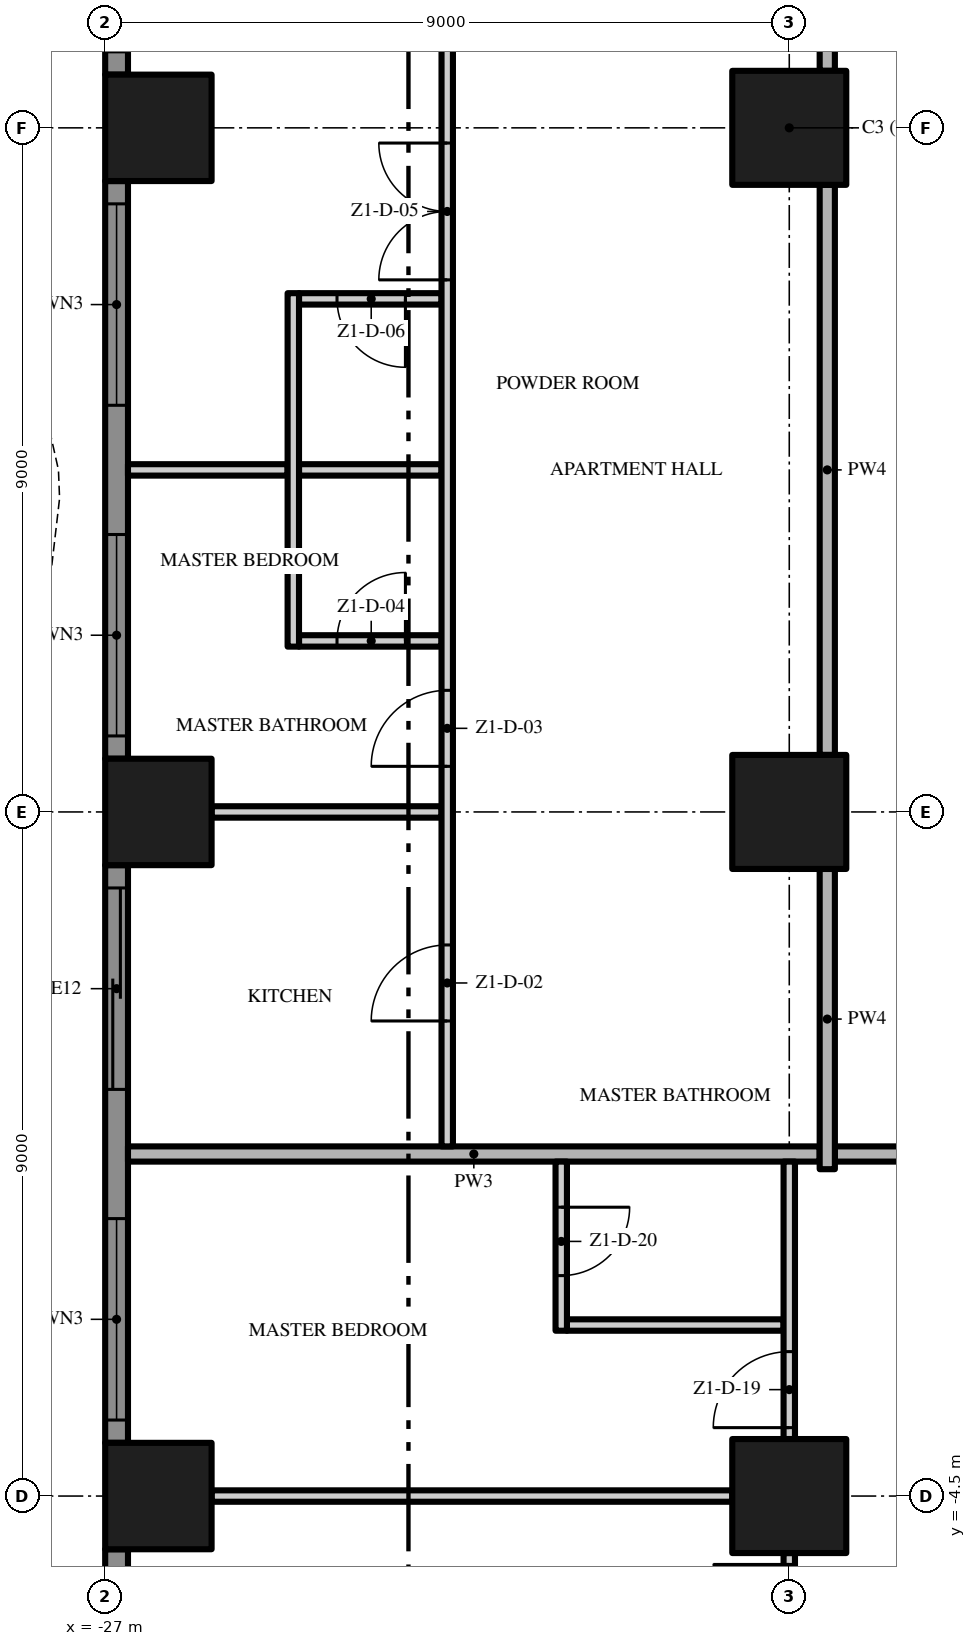
"""IFC4 building model, lengths in metres.
Left out: names, types, materials, properties, quantities, classifications, styles, units other than length and angle.
Written with IfcOpenShell. Run it as: python <this file> out.ifc"""

import sys

from ifc_helpers import new_model, si_unit, direction, frame, frame_2d, origin, origin_2d, place, context, subcontext, project, spatial, polyline, rectangle, outline, extrude, element, fill, save


model = new_model("IFC4")
c1 = context("Model", 3, precision=1e-05, world=origin(), true_north=direction((0.0, 1.0)))
c2 = subcontext(c1, "Body", "Model", "MODEL_VIEW")
j1 = project(units=[si_unit("LENGTHUNIT", "METRE"), si_unit("PLANEANGLEUNIT", "RADIAN")], contexts=[c1])
p1 = place(None, origin())
s1 = spatial("IfcSite", under=j1, at=p1, CompositionType="ELEMENT")
p2 = place(p1, origin())
s2 = spatial("IfcBuilding", under=s1, at=p2, CompositionType="ELEMENT")
p3 = place(p2, frame((0.0, 0.0, 49.2)))
s3 = spatial("IfcBuildingStorey", under=s2, at=p3, CompositionType="ELEMENT", Elevation=49.2)
for number, where, z_axis, x_axis in (
    (1, (-18.0, -4.5, 0.0), (0.0, 0.0, 1.0), (1.0, 0.0, 0.0)),
    (2, (-18.0, 13.5, 0.0), (0.0, 0.0, 1.0), (1.0, 0.0, 0.0)),
    (3, (-18.0, 4.5, 0.0), (0.0, 0.0, 1.0), (1.0, 0.0, 0.0)),
):
    element("IfcColumn", number, at=place(p3, frame(where, z_axis=z_axis, x_axis=x_axis)), inside=s3, PredefinedType="COLUMN", context=c2, shape_type="SweptSolid", body=[
        extrude(rectangle(XDim=1.5, YDim=1.5, at=origin_2d()), origin(), (0.0, 0.0, 1.0), 3.5),
    ])
for number, where, z_axis, x_axis in (
    (4, (-26.3, -4.5, 0.0), (0.0, 0.0, 1.0), (1.0, 0.0, 0.0)),
    (5, (-26.3, 13.5, 0.0), (0.0, 0.0, 1.0), (1.0, 0.0, 0.0)),
    (6, (-26.3, 4.5, 0.0), (0.0, 0.0, 1.0), (1.0, 0.0, 0.0)),
):
    element("IfcColumn", number, at=place(p3, frame(where, z_axis=z_axis, x_axis=x_axis)), inside=s3, PredefinedType="COLUMN", context=c2, shape_type="SweptSolid", body=[
        extrude(rectangle(XDim=1.4, YDim=1.4, at=origin_2d()), origin(), (0.0, 0.0, 1.0), 3.5),
    ])
p4 = place(p3, frame((-26.85, 14.2, 0.0), z_axis=(0.0, 0.0, 1.0), x_axis=(0.0, 1.0, 0.0)))
e7 = element("IfcWall", 7, at=p4, inside=s3, PredefinedType="SOLIDWALL", context=c2, shape_type="SweptSolid", body=[
    extrude(rectangle(XDim=3.5, YDim=0.3, at=frame_2d((1.75, 0.0))), origin(), (0.0, 0.0, 1.0), 3.5),
])
p5 = place(p4, frame((0.3, 0.0, 0.0)))
e8 = element("IfcOpeningElement", 8, at=p5, cuts=e7, PredefinedType="OPENING", context=c2, shape_type="SweptSolid", body=[
    extrude(rectangle(XDim=2.65, YDim=2.4, at=frame_2d((1.325, 1.2))), frame((0.0, 0.16, 0.0), z_axis=(0.0, -1.0, 0.0), x_axis=(1.0, 0.0, 0.0)), (0.0, 0.0, 1.0), 0.32),
])
p6 = place(p3, frame((-26.85, 5.2, 0.0), z_axis=(0.0, 0.0, 1.0), x_axis=(0.0, 1.0, 0.0)))
e9 = element("IfcWall", 9, at=p6, inside=s3, PredefinedType="SOLIDWALL", context=c2, shape_type="SweptSolid", body=[
    extrude(rectangle(XDim=7.6, YDim=0.3, at=frame_2d((3.8, 0.0))), origin(), (0.0, 0.0, 1.0), 3.5),
])
p7 = place(p6, frame((4.65, 0.0, 0.45)))
e10 = element("IfcOpeningElement", 10, at=p7, cuts=e9, PredefinedType="OPENING", context=c2, shape_type="SweptSolid", body=[
    extrude(rectangle(XDim=2.65, YDim=2.65, at=frame_2d((1.325, 1.325))), frame((0.0, 0.16, 0.0), z_axis=(0.0, -1.0, 0.0), x_axis=(1.0, 0.0, 0.0)), (0.0, 0.0, 1.0), 0.32),
])
p8 = place(p6, frame((0.3, 0.0, 0.45)))
e11 = element("IfcOpeningElement", 11, at=p8, cuts=e9, PredefinedType="OPENING", context=c2, shape_type="SweptSolid", body=[
    extrude(rectangle(XDim=2.65, YDim=2.65, at=frame_2d((1.325, 1.325))), frame((0.0, 0.16, 0.0), z_axis=(0.0, -1.0, 0.0), x_axis=(1.0, 0.0, 0.0)), (0.0, 0.0, 1.0), 0.32),
])
p9 = place(p3, frame((-26.85, -3.8, 0.0), z_axis=(0.0, 0.0, 1.0), x_axis=(0.0, 1.0, 0.0)))
e12 = element("IfcWall", 12, at=p9, inside=s3, PredefinedType="SOLIDWALL", context=c2, shape_type="SweptSolid", body=[
    extrude(rectangle(XDim=7.6, YDim=0.3, at=frame_2d((3.8, 0.0))), origin(), (0.0, 0.0, 1.0), 3.5),
])
p10 = place(p9, frame((4.65, 0.0, 0.0)))
e13 = element("IfcOpeningElement", 13, at=p10, cuts=e12, PredefinedType="OPENING", context=c2, shape_type="SweptSolid", body=[
    extrude(rectangle(XDim=2.65, YDim=2.4, at=frame_2d((1.325, 1.2))), frame((0.0, 0.16, 0.0), z_axis=(0.0, -1.0, 0.0), x_axis=(1.0, 0.0, 0.0)), (0.0, 0.0, 1.0), 0.32),
])
p11 = place(p9, frame((0.3, 0.0, 0.45)))
e14 = element("IfcOpeningElement", 14, at=p11, cuts=e12, PredefinedType="OPENING", context=c2, shape_type="SweptSolid", body=[
    extrude(rectangle(XDim=2.65, YDim=2.65, at=frame_2d((1.325, 1.325))), frame((0.0, 0.16, 0.0), z_axis=(0.0, -1.0, 0.0), x_axis=(1.0, 0.0, 0.0)), (0.0, 0.0, 1.0), 0.32),
])
p12 = place(p3, frame((-26.85, -12.8, 0.0), z_axis=(0.0, 0.0, 1.0), x_axis=(0.0, 1.0, 0.0)))
e15 = element("IfcWall", 15, at=p12, inside=s3, PredefinedType="SOLIDWALL", context=c2, shape_type="SweptSolid", body=[
    extrude(rectangle(XDim=7.6, YDim=0.3, at=frame_2d((3.8, 0.0))), origin(), (0.0, 0.0, 1.0), 3.5),
])
p13 = place(p12, frame((4.65, 0.0, 0.45)))
e16 = element("IfcOpeningElement", 16, at=p13, cuts=e15, PredefinedType="OPENING", context=c2, shape_type="SweptSolid", body=[
    extrude(rectangle(XDim=2.65, YDim=2.65, at=frame_2d((1.325, 1.325))), frame((0.0, 0.16, 0.0), z_axis=(0.0, -1.0, 0.0), x_axis=(1.0, 0.0, 0.0)), (0.0, 0.0, 1.0), 0.32),
])
p14 = place(p12, frame((0.3, 0.0, 0.0)))
e17 = element("IfcOpeningElement", 17, at=p14, cuts=e15, PredefinedType="OPENING", context=c2, shape_type="SweptSolid", body=[
    extrude(rectangle(XDim=2.65, YDim=2.4, at=frame_2d((1.325, 1.2))), frame((0.0, 0.16, 0.0), z_axis=(0.0, -1.0, 0.0), x_axis=(1.0, 0.0, 0.0)), (0.0, 0.0, 1.0), 0.32),
])
p15 = place(p3, origin())
e18 = element("IfcWall", 18, at=p15, inside=s3, PredefinedType="USERDEFINED", context=c2, shape_type="SweptSolid", body=[
    extrude(outline(polyline([(-29.649, 18.0), (-29.985, 16.5), (-30.0, 16.125), (-29.869, 15.0), (-29.345, 13.5), (-28.612, 12.0), (-27.951, 10.5), (-27.615, 9.0), (-27.6, 8.625), (-27.731, 7.5), (-28.255, 6.0), (-28.988, 4.5), (-29.649, 3.0), (-29.985, 1.5), (-30.0, 1.125), (-29.869, 0.0), (-29.345, -1.5), (-28.612, -3.0), (-27.951, -4.5), (-27.615, -6.0), (-27.6, -6.375), (-27.731, -7.5), (-28.255, -9.0), (-28.988, -10.5), (-29.649, -12.0), (-29.985, -13.5), (-30.0, -13.875), (-29.869, -15.0), (-29.345, -16.5), (-28.612, -18.0), (-28.388, -17.89), (-29.114, -16.404), (-29.624, -14.944), (-29.749, -13.865), (-29.736, -13.533), (-29.41, -12.079), (-28.761, -10.605), (-28.024, -9.096), (-27.486, -7.556), (-27.349, -6.385), (-27.366, -5.967), (-27.713, -4.421), (-28.385, -2.895), (-29.114, -1.404), (-29.624, 0.056), (-29.749, 1.135), (-29.736, 1.467), (-29.41, 2.921), (-28.761, 4.395), (-28.024, 5.904), (-27.486, 7.444), (-27.349, 8.615), (-27.366, 9.033), (-27.713, 10.579), (-28.385, 12.105), (-29.114, 13.596), (-29.624, 15.056), (-29.749, 16.135), (-29.736, 16.467), (-29.405, 17.945), (-29.649, 18.0)])), origin(), (0.0, 0.0, 1.0), 0.9),
])
p16 = place(p3, frame((-25.6, -4.5, 0.0), z_axis=(0.0, 0.0, 1.0), x_axis=(1.0, 0.0, 0.0)))
e19 = element("IfcWall", 19, at=p16, inside=s3, PredefinedType="PARTITIONING", context=c2, shape_type="SweptSolid", body=[
    extrude(rectangle(XDim=6.85, YDim=0.15, at=frame_2d((3.425, 0.0))), origin(), (0.0, 0.0, 1.0), 3.5),
])
p17 = place(p3, frame((-20.925, -2.25, 0.0), z_axis=(0.0, 0.0, 1.0), x_axis=(1.0, 0.0, 0.0)))
e20 = element("IfcWall", 20, at=p17, inside=s3, PredefinedType="PARTITIONING", context=c2, shape_type="SweptSolid", body=[
    extrude(rectangle(XDim=2.85, YDim=0.15, at=frame_2d((1.425, 0.0))), origin(), (0.0, 0.0, 1.0), 3.5),
])
p18 = place(p3, frame((-17.4, 0.0, 0.0), z_axis=(0.0, 0.0, 1.0), x_axis=(1.0, 0.0, 0.0)))
e21 = element("IfcWall", 21, at=p18, inside=s3, PredefinedType="PARTITIONING", context=c2, shape_type="SweptSolid", body=[
    extrude(rectangle(XDim=12.8, YDim=0.2, at=frame_2d((6.4, 0.0))), origin(), (0.0, 0.0, 1.0), 3.5),
])
p19 = place(p3, frame((-26.7, 0.0, 0.0), z_axis=(0.0, 0.0, 1.0), x_axis=(1.0, 0.0, 0.0)))
e22 = element("IfcWall", 22, at=p19, inside=s3, PredefinedType="PARTITIONING", context=c2, shape_type="SweptSolid", body=[
    extrude(rectangle(XDim=9.1, YDim=0.2, at=frame_2d((4.55, 0.0))), origin(), (0.0, 0.0, 1.0), 3.5),
])
p20 = place(p3, frame((-25.6, 4.5, 0.0), z_axis=(0.0, 0.0, 1.0), x_axis=(1.0, 0.0, 0.0)))
e23 = element("IfcWall", 23, at=p20, inside=s3, PredefinedType="PARTITIONING", context=c2, shape_type="SweptSolid", body=[
    extrude(rectangle(XDim=3.025, YDim=0.15, at=frame_2d((1.512, 0.0))), origin(), (0.0, 0.0, 1.0), 3.5),
])
p21 = place(p3, frame((-24.45, 6.75, 0.0), z_axis=(0.0, 0.0, 1.0), x_axis=(1.0, 0.0, 0.0)))
e24 = element("IfcWall", 24, at=p21, inside=s3, PredefinedType="PARTITIONING", context=c2, shape_type="SweptSolid", body=[
    extrude(rectangle(XDim=1.875, YDim=0.15, at=frame_2d((0.938, 0.0))), origin(), (0.0, 0.0, 1.0), 3.5),
])
p22 = place(p21, frame((0.5, 0.0, 0.0)))
e25 = element("IfcOpeningElement", 25, at=p22, cuts=e24, PredefinedType="OPENING", context=c2, shape_type="SweptSolid", body=[
    extrude(rectangle(XDim=0.9, YDim=2.1, at=frame_2d((0.45, 1.05))), frame((0.0, 0.085, 0.0), z_axis=(0.0, -1.0, 0.0), x_axis=(1.0, 0.0, 0.0)), (0.0, 0.0, 1.0), 0.17),
])
p23 = place(p3, frame((-26.7, 9.0, 0.0), z_axis=(0.0, 0.0, 1.0), x_axis=(1.0, 0.0, 0.0)))
e26 = element("IfcWall", 26, at=p23, inside=s3, PredefinedType="PARTITIONING", context=c2, shape_type="SweptSolid", body=[
    extrude(rectangle(XDim=2.1, YDim=0.15, at=frame_2d((1.05, 0.0))), origin(), (0.0, 0.0, 1.0), 3.5),
])
p24 = place(p3, frame((-24.45, 9.0, 0.0), z_axis=(0.0, 0.0, 1.0), x_axis=(1.0, 0.0, 0.0)))
e27 = element("IfcWall", 27, at=p24, inside=s3, PredefinedType="PARTITIONING", context=c2, shape_type="SweptSolid", body=[
    extrude(rectangle(XDim=1.875, YDim=0.15, at=frame_2d((0.938, 0.0))), origin(), (0.0, 0.0, 1.0), 3.5),
])
p25 = place(p3, frame((-22.575, 11.25, 0.0), z_axis=(0.0, 0.0, 1.0), x_axis=(-1.0, 0.0, 0.0)))
e28 = element("IfcWall", 28, at=p25, inside=s3, PredefinedType="PARTITIONING", context=c2, shape_type="SweptSolid", body=[
    extrude(rectangle(XDim=1.875, YDim=0.15, at=frame_2d((0.938, 0.0))), origin(), (0.0, 0.0, 1.0), 3.5),
])
p26 = place(p25, frame((0.475, 0.0, 0.0)))
e29 = element("IfcOpeningElement", 29, at=p26, cuts=e28, PredefinedType="OPENING", context=c2, shape_type="SweptSolid", body=[
    extrude(rectangle(XDim=0.9, YDim=2.1, at=frame_2d((0.45, 1.05))), frame((0.0, 0.085, 0.0), z_axis=(0.0, -1.0, 0.0), x_axis=(1.0, 0.0, 0.0)), (0.0, 0.0, 1.0), 0.17),
])
p27 = place(p3, frame((-24.525, 6.675, 0.0), z_axis=(0.0, 0.0, 1.0), x_axis=(0.0, 1.0, 0.0)))
e30 = element("IfcWall", 30, at=p27, inside=s3, PredefinedType="PARTITIONING", context=c2, shape_type="SweptSolid", body=[
    extrude(rectangle(XDim=4.65, YDim=0.15, at=frame_2d((2.325, 0.0))), origin(), (0.0, 0.0, 1.0), 3.5),
])
p28 = place(p3, frame((-22.5, 0.1, 0.0), z_axis=(0.0, 0.0, 1.0), x_axis=(0.0, 1.0, 0.0)))
e31 = element("IfcWall", 31, at=p28, inside=s3, PredefinedType="PARTITIONING", context=c2, shape_type="SweptSolid", body=[
    extrude(rectangle(XDim=17.2, YDim=0.15, at=frame_2d((8.6, 0.0))), origin(), (0.0, 0.0, 1.0), 3.5),
])
p29 = place(p28, frame((1.65, 0.0, 0.0)))
e32 = element("IfcOpeningElement", 32, at=p29, cuts=e31, PredefinedType="OPENING", context=c2, shape_type="SweptSolid", body=[
    extrude(rectangle(XDim=1.0, YDim=2.4, at=frame_2d((0.5, 1.2))), frame((0.0, 0.085, 0.0), z_axis=(0.0, -1.0, 0.0), x_axis=(1.0, 0.0, 0.0)), (0.0, 0.0, 1.0), 0.17),
])
p30 = place(p28, frame((5.0, 0.0, 0.0)))
e33 = element("IfcOpeningElement", 33, at=p30, cuts=e31, PredefinedType="OPENING", context=c2, shape_type="SweptSolid", body=[
    extrude(rectangle(XDim=1.0, YDim=2.4, at=frame_2d((0.5, 1.2))), frame((0.0, 0.085, 0.0), z_axis=(0.0, -1.0, 0.0), x_axis=(1.0, 0.0, 0.0)), (0.0, 0.0, 1.0), 0.17),
])
p31 = place(p28, frame((11.4, 0.0, 0.0)))
e34 = element("IfcOpeningElement", 34, at=p31, cuts=e31, PredefinedType="OPENING", context=c2, shape_type="SweptSolid", body=[
    extrude(rectangle(XDim=1.8, YDim=2.4, at=frame_2d((0.9, 1.2))), frame((0.0, 0.085, 0.0), z_axis=(0.0, -1.0, 0.0), x_axis=(1.0, 0.0, 0.0)), (0.0, 0.0, 1.0), 0.17),
])
p32 = place(p3, frame((-21.0, -0.1, 0.0), z_axis=(0.0, 0.0, 1.0), x_axis=(0.0, -1.0, 0.0)))
e35 = element("IfcWall", 35, at=p32, inside=s3, PredefinedType="PARTITIONING", context=c2, shape_type="SweptSolid", body=[
    extrude(rectangle(XDim=2.225, YDim=0.15, at=frame_2d((1.113, 0.0))), origin(), (0.0, 0.0, 1.0), 3.5),
])
p33 = place(p32, frame((0.6, 0.0, 0.0)))
e36 = element("IfcOpeningElement", 36, at=p33, cuts=e35, PredefinedType="OPENING", context=c2, shape_type="SweptSolid", body=[
    extrude(rectangle(XDim=0.9, YDim=2.1, at=frame_2d((0.45, 1.05))), frame((0.0, 0.085, 0.0), z_axis=(0.0, -1.0, 0.0), x_axis=(1.0, 0.0, 0.0)), (0.0, 0.0, 1.0), 0.17),
])
p34 = place(p3, frame((-18.0, -12.75, 0.0), z_axis=(0.0, 0.0, 1.0), x_axis=(0.0, 1.0, 0.0)))
e37 = element("IfcWall", 37, at=p34, inside=s3, PredefinedType="PARTITIONING", context=c2, shape_type="SweptSolid", body=[
    extrude(rectangle(XDim=7.5, YDim=0.15, at=frame_2d((3.75, 0.0))), origin(), (0.0, 0.0, 1.0), 3.5),
])
p35 = place(p34, frame((6.35, 0.0, 0.0)))
e38 = element("IfcOpeningElement", 38, at=p35, cuts=e37, PredefinedType="OPENING", context=c2, shape_type="SweptSolid", body=[
    extrude(rectangle(XDim=1.0, YDim=2.4, at=frame_2d((0.5, 1.2))), frame((0.0, 0.085, 0.0), z_axis=(0.0, -1.0, 0.0), x_axis=(1.0, 0.0, 0.0)), (0.0, 0.0, 1.0), 0.17),
])
p36 = place(p34, frame((0.15, 0.0, 0.0)))
e39 = element("IfcOpeningElement", 39, at=p36, cuts=e37, PredefinedType="OPENING", context=c2, shape_type="SweptSolid", body=[
    extrude(rectangle(XDim=1.0, YDim=2.4, at=frame_2d((0.5, 1.2))), frame((0.0, 0.085, 0.0), z_axis=(0.0, -1.0, 0.0), x_axis=(1.0, 0.0, 0.0)), (0.0, 0.0, 1.0), 0.17),
])
p37 = place(p3, frame((-18.0, -3.75, 0.0), z_axis=(0.0, 0.0, 1.0), x_axis=(0.0, 1.0, 0.0)))
e40 = element("IfcWall", 40, at=p37, inside=s3, PredefinedType="PARTITIONING", context=c2, shape_type="SweptSolid", body=[
    extrude(rectangle(XDim=3.65, YDim=0.15, at=frame_2d((1.825, 0.0))), origin(), (0.0, 0.0, 1.0), 3.5),
])
p38 = place(p37, frame((0.15, 0.0, 0.0)))
e41 = element("IfcOpeningElement", 41, at=p38, cuts=e40, PredefinedType="OPENING", context=c2, shape_type="SweptSolid", body=[
    extrude(rectangle(XDim=1.0, YDim=2.4, at=frame_2d((0.5, 1.2))), frame((0.0, 0.085, 0.0), z_axis=(0.0, -1.0, 0.0), x_axis=(1.0, 0.0, 0.0)), (0.0, 0.0, 1.0), 0.17),
])
p39 = place(p3, frame((-17.5, -0.2, 0.0), z_axis=(0.0, 0.0, 1.0), x_axis=(0.0, 1.0, 0.0)))
e42 = element("IfcWall", 42, at=p39, inside=s3, PredefinedType="PARTITIONING", context=c2, shape_type="SweptSolid", body=[
    extrude(rectangle(XDim=3.95, YDim=0.2, at=frame_2d((1.975, 0.0))), origin(), (0.0, 0.0, 1.0), 3.5),
])
p40 = place(p3, frame((-17.5, 5.25, 0.0), z_axis=(0.0, 0.0, 1.0), x_axis=(0.0, 1.0, 0.0)))
e43 = element("IfcWall", 43, at=p40, inside=s3, PredefinedType="PARTITIONING", context=c2, shape_type="SweptSolid", body=[
    extrude(rectangle(XDim=7.5, YDim=0.2, at=frame_2d((3.75, 0.0))), origin(), (0.0, 0.0, 1.0), 3.5),
])
p41 = place(p3, frame((-17.5, 14.25, 0.0), z_axis=(0.0, 0.0, 1.0), x_axis=(0.0, 1.0, 0.0)))
e44 = element("IfcWall", 44, at=p41, inside=s3, PredefinedType="PARTITIONING", context=c2, shape_type="SweptSolid", body=[
    extrude(rectangle(XDim=6.85, YDim=0.2, at=frame_2d((3.425, 0.0))), origin(), (0.0, 0.0, 1.0), 3.5),
])
p42 = place(p41, frame((0.9, 0.0, 0.0)))
e45 = element("IfcOpeningElement", 45, at=p42, cuts=e44, PredefinedType="OPENING", context=c2, shape_type="SweptSolid", body=[
    extrude(rectangle(XDim=1.2, YDim=2.4, at=frame_2d((0.6, 1.2))), frame((0.0, 0.11, 0.0), z_axis=(0.0, -1.0, 0.0), x_axis=(1.0, 0.0, 0.0)), (0.0, 0.0, 1.0), 0.22),
])
p43 = place(p7, origin())
e46 = element("IfcWindow", 46, at=p43, inside=s3, PartitioningType="SINGLE_PANEL", PredefinedType="WINDOW", context=c2, shape_type="SweptSolid", body=[
    extrude(rectangle(XDim=2.65, YDim=2.65, at=frame_2d((1.325, 1.325))), frame((0.0, 0.03, 0.0), z_axis=(0.0, -1.0, 0.0), x_axis=(1.0, 0.0, 0.0)), (0.0, 0.0, 1.0), 0.06),
])
fill(e10, e46)
p44 = place(p8, origin())
e47 = element("IfcWindow", 47, at=p44, inside=s3, PartitioningType="SINGLE_PANEL", PredefinedType="WINDOW", context=c2, shape_type="SweptSolid", body=[
    extrude(rectangle(XDim=2.65, YDim=2.65, at=frame_2d((1.325, 1.325))), frame((0.0, 0.03, 0.0), z_axis=(0.0, -1.0, 0.0), x_axis=(1.0, 0.0, 0.0)), (0.0, 0.0, 1.0), 0.06),
])
fill(e11, e47)
p45 = place(p10, origin())
e48 = element("IfcDoor", 48, at=p45, inside=s3, OperationType="SINGLE_SWING_LEFT", PredefinedType="DOOR", context=c2, shape_type="SweptSolid", body=[
    extrude(rectangle(XDim=2.65, YDim=2.4, at=frame_2d((1.325, 1.2))), frame((0.0, 0.025, 0.0), z_axis=(0.0, -1.0, 0.0), x_axis=(1.0, 0.0, 0.0)), (0.0, 0.0, 1.0), 0.05),
])
fill(e13, e48)
p46 = place(p11, origin())
e49 = element("IfcWindow", 49, at=p46, inside=s3, PartitioningType="SINGLE_PANEL", PredefinedType="WINDOW", context=c2, shape_type="SweptSolid", body=[
    extrude(rectangle(XDim=2.65, YDim=2.65, at=frame_2d((1.325, 1.325))), frame((0.0, 0.03, 0.0), z_axis=(0.0, -1.0, 0.0), x_axis=(1.0, 0.0, 0.0)), (0.0, 0.0, 1.0), 0.06),
])
fill(e14, e49)
p47 = place(p29, origin())
e50 = element("IfcDoor", 50, at=p47, inside=s3, OperationType="SINGLE_SWING_LEFT", PredefinedType="DOOR", context=c2, shape_type="SweptSolid", body=[
    extrude(rectangle(XDim=1.0, YDim=2.4, at=frame_2d((0.5, 1.2))), frame((0.0, 0.025, 0.0), z_axis=(0.0, -1.0, 0.0), x_axis=(1.0, 0.0, 0.0)), (0.0, 0.0, 1.0), 0.05),
])
fill(e32, e50)
p48 = place(p30, origin())
e51 = element("IfcDoor", 51, at=p48, inside=s3, OperationType="SINGLE_SWING_LEFT", PredefinedType="DOOR", context=c2, shape_type="SweptSolid", body=[
    extrude(rectangle(XDim=1.0, YDim=2.4, at=frame_2d((0.5, 1.2))), frame((0.0, 0.025, 0.0), z_axis=(0.0, -1.0, 0.0), x_axis=(1.0, 0.0, 0.0)), (0.0, 0.0, 1.0), 0.05),
])
fill(e33, e51)
p49 = place(p22, origin())
e52 = element("IfcDoor", 52, at=p49, inside=s3, OperationType="SINGLE_SWING_RIGHT", PredefinedType="DOOR", context=c2, shape_type="SweptSolid", body=[
    extrude(rectangle(XDim=0.9, YDim=2.1, at=frame_2d((0.45, 1.05))), frame((0.0, 0.025, 0.0), z_axis=(0.0, -1.0, 0.0), x_axis=(1.0, 0.0, 0.0)), (0.0, 0.0, 1.0), 0.05),
])
fill(e25, e52)
p50 = place(p31, origin())
e53 = element("IfcDoor", 53, at=p50, inside=s3, OperationType="DOUBLE_DOOR_SINGLE_SWING", PredefinedType="DOOR", context=c2, shape_type="SweptSolid", body=[
    extrude(rectangle(XDim=1.8, YDim=2.4, at=frame_2d((0.9, 1.2))), frame((0.0, 0.025, 0.0), z_axis=(0.0, -1.0, 0.0), x_axis=(1.0, 0.0, 0.0)), (0.0, 0.0, 1.0), 0.05),
])
fill(e34, e53)
p51 = place(p26, origin())
e54 = element("IfcDoor", 54, at=p51, inside=s3, OperationType="SINGLE_SWING_LEFT", PredefinedType="DOOR", context=c2, shape_type="SweptSolid", body=[
    extrude(rectangle(XDim=0.9, YDim=2.1, at=frame_2d((0.45, 1.05))), frame((0.0, 0.025, 0.0), z_axis=(0.0, -1.0, 0.0), x_axis=(1.0, 0.0, 0.0)), (0.0, 0.0, 1.0), 0.05),
])
fill(e29, e54)
p52 = place(p38, origin())
e55 = element("IfcDoor", 55, at=p52, inside=s3, OperationType="SINGLE_SWING_LEFT", PredefinedType="DOOR", context=c2, shape_type="SweptSolid", body=[
    extrude(rectangle(XDim=1.0, YDim=2.4, at=frame_2d((0.5, 1.2))), frame((0.0, 0.025, 0.0), z_axis=(0.0, -1.0, 0.0), x_axis=(1.0, 0.0, 0.0)), (0.0, 0.0, 1.0), 0.05),
])
fill(e41, e55)
p53 = place(p33, origin())
e56 = element("IfcDoor", 56, at=p53, inside=s3, OperationType="SINGLE_SWING_LEFT", PredefinedType="DOOR", context=c2, shape_type="SweptSolid", body=[
    extrude(rectangle(XDim=0.9, YDim=2.1, at=frame_2d((0.45, 1.05))), frame((0.0, 0.025, 0.0), z_axis=(0.0, -1.0, 0.0), x_axis=(1.0, 0.0, 0.0)), (0.0, 0.0, 1.0), 0.05),
])
fill(e36, e56)
p54 = place(p35, origin())
e57 = element("IfcDoor", 57, at=p54, inside=s3, OperationType="SINGLE_SWING_RIGHT", PredefinedType="DOOR", context=c2, shape_type="SweptSolid", body=[
    extrude(rectangle(XDim=1.0, YDim=2.4, at=frame_2d((0.5, 1.2))), frame((0.0, 0.025, 0.0), z_axis=(0.0, -1.0, 0.0), x_axis=(1.0, 0.0, 0.0)), (0.0, 0.0, 1.0), 0.05),
])
fill(e38, e57)
save(model, sys.argv[1])
